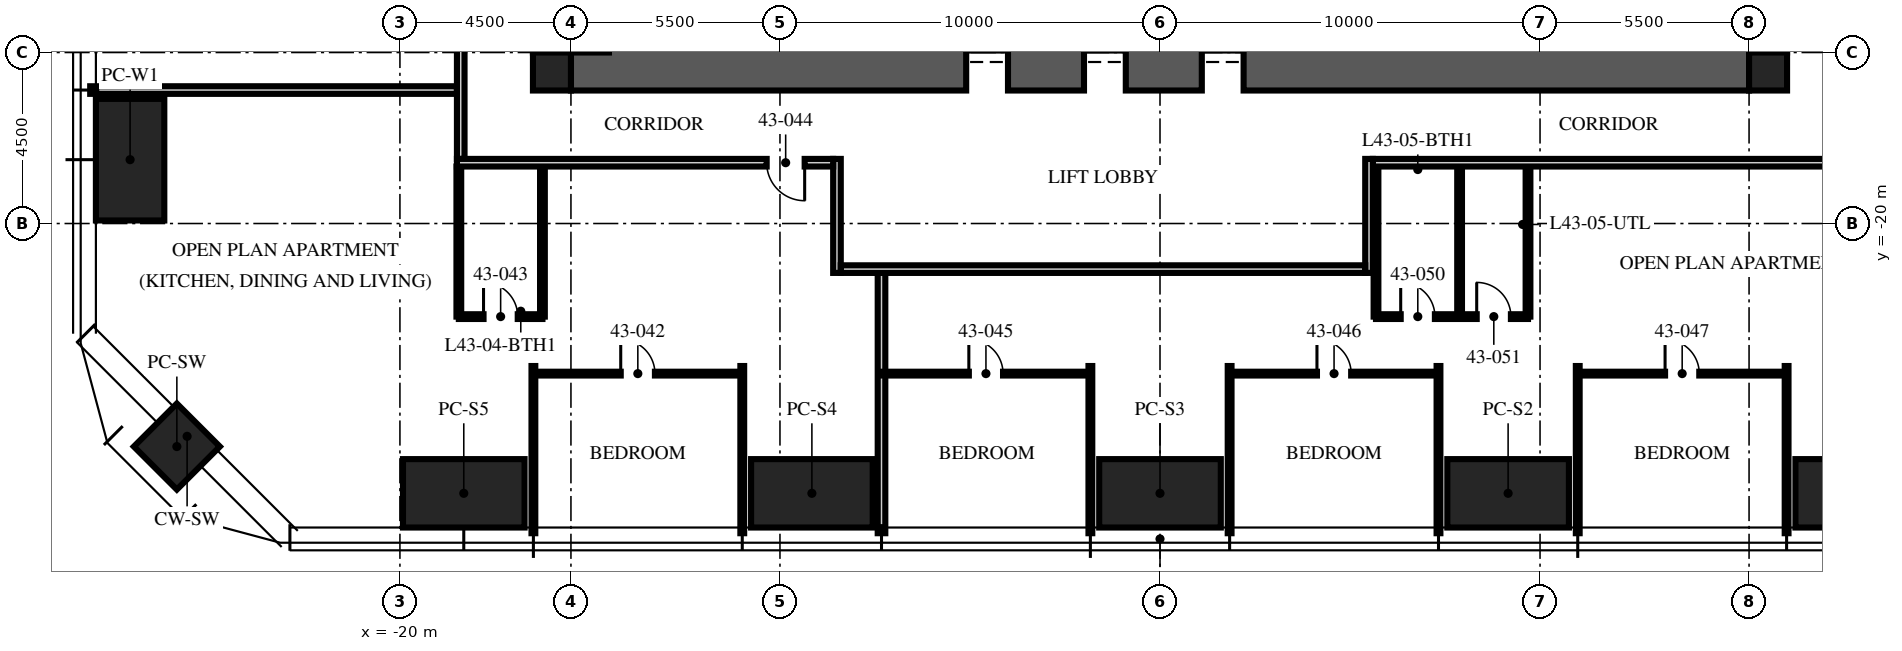
"""IFC4 building model, lengths in metres.
Left out: names, types, materials, properties, quantities, classifications, styles, units other than length and angle.
Written with IfcOpenShell. Run it as: python <this file> out.ifc"""

import sys

from ifc_helpers import new_model, si_unit, direction, frame, frame_2d, origin, origin_2d, place, context, subcontext, project, spatial, rectangle, hollow_rectangle, extrude, element, fill, save


model = new_model("IFC4")
c1 = context("Model", 3, precision=1e-05, world=origin(), true_north=direction((0.0, 1.0)))
c2 = subcontext(c1, "Body", "Model", "MODEL_VIEW")
j1 = project(units=[si_unit("LENGTHUNIT", "METRE"), si_unit("PLANEANGLEUNIT", "RADIAN")], contexts=[c1])
p1 = place(None, origin())
s1 = spatial("IfcSite", under=j1, at=p1, CompositionType="ELEMENT")
p2 = place(p1, origin())
s2 = spatial("IfcBuilding", under=s1, at=p2, CompositionType="ELEMENT")
p3 = place(p2, frame((0.0, 0.0, 171.0)))
s3 = spatial("IfcBuildingStorey", under=s2, at=p3, CompositionType="ELEMENT", Elevation=171.0)
p4 = place(p3, frame((-15.5, -15.5, -0.25), z_axis=(0.0, 0.0, 1.0), x_axis=(1.0, 0.0, 0.0)))
e1 = element("IfcWall", 1, at=p4, inside=s3, PredefinedType="SHEAR", context=c2, shape_type="SweptSolid", body=[
    extrude(rectangle(XDim=31.0, YDim=2.0, at=frame_2d((15.5, 0.0))), origin(), (0.0, 0.0, 1.0), 3.75),
])
p5 = place(p4, frame((10.4, 0.0, 0.25)))
e2 = element("IfcOpeningElement", 2, at=p5, cuts=e1, PredefinedType="OPENING", context=c2, shape_type="SweptSolid", body=[
    extrude(rectangle(XDim=1.1, YDim=2.1, at=frame_2d((0.55, 1.05))), frame((0.0, 1.01, 0.0), z_axis=(0.0, -1.0, 0.0), x_axis=(1.0, 0.0, 0.0)), (0.0, 0.0, 1.0), 2.02),
])
p6 = place(p4, frame((13.5, 0.0, 0.25)))
e3 = element("IfcOpeningElement", 3, at=p6, cuts=e1, PredefinedType="OPENING", context=c2, shape_type="SweptSolid", body=[
    extrude(rectangle(XDim=1.1, YDim=2.1, at=frame_2d((0.55, 1.05))), frame((0.0, 1.01, 0.0), z_axis=(0.0, -1.0, 0.0), x_axis=(1.0, 0.0, 0.0)), (0.0, 0.0, 1.0), 2.02),
])
p7 = place(p4, frame((16.6, 0.0, 0.25)))
e4 = element("IfcOpeningElement", 4, at=p7, cuts=e1, PredefinedType="OPENING", context=c2, shape_type="SweptSolid", body=[
    extrude(rectangle(XDim=1.1, YDim=2.1, at=frame_2d((0.55, 1.05))), frame((0.0, 1.01, 0.0), z_axis=(0.0, -1.0, 0.0), x_axis=(1.0, 0.0, 0.0)), (0.0, 0.0, 1.0), 2.02),
])
for number, where, z_axis, x_axis in (
    (5, (-16.0, -16.0, -0.25), (0.0, 0.0, 1.0), (1.0, 0.0, 0.0)),
    (6, (16.0, -16.0, -0.25), (0.0, 0.0, 1.0), (1.0, 0.0, 0.0)),
):
    element("IfcColumn", number, at=place(p3, frame(where, z_axis=z_axis, x_axis=x_axis)), inside=s3, PredefinedType="COLUMN", context=c2, shape_type="SweptSolid", body=[
        extrude(rectangle(XDim=1.0, YDim=1.0, at=origin_2d()), origin(), (0.0, 0.0, 1.0), 3.75),
    ])
for number, where, z_axis, x_axis in (
    (7, (18.32, -27.1, 0.0), (0.0, 0.0, 1.0), (1.0, 0.0, 0.0)),
    (8, (9.16, -27.1, 0.0), (0.0, 0.0, 1.0), (1.0, 0.0, 0.0)),
    (9, (0.0, -27.1, 0.0), (0.0, 0.0, 1.0), (1.0, 0.0, 0.0)),
    (10, (-9.16, -27.1, 0.0), (0.0, 0.0, 1.0), (1.0, 0.0, 0.0)),
    (11, (-18.32, -27.1, 0.0), (0.0, 0.0, 1.0), (1.0, 0.0, 0.0)),
    (12, (-27.1, -18.32, 0.0), (0.0, 0.0, 1.0), (0.0, 1.0, 0.0)),
):
    element("IfcColumn", number, at=place(p3, frame(where, z_axis=z_axis, x_axis=x_axis)), inside=s3, PredefinedType="COLUMN", context=c2, shape_type="SweptSolid", body=[
        extrude(hollow_rectangle(XDim=3.2, YDim=1.8, WallThickness=0.2, at=origin_2d()), origin(), (0.0, 0.0, 1.0), 3.75),
    ])
p8 = place(p3, frame((-25.87, -25.87, 0.0), z_axis=(0.0, 0.0, 1.0), x_axis=(0.707106781187, -0.707106781187, 0.0)))
e13 = element("IfcColumn", 13, at=p8, inside=s3, PredefinedType="COLUMN", context=c2, shape_type="SweptSolid", body=[
    extrude(hollow_rectangle(XDim=1.6, YDim=1.6, WallThickness=0.1, at=origin_2d()), origin(), (0.0, 0.0, 1.0), 3.75),
])
p9 = place(p3, frame((-18.5, -16.488, 0.0), z_axis=(0.0, 0.0, 1.0), x_axis=(-1.0, 0.0, 0.0)))
e14 = element("IfcWall", 14, at=p9, inside=s3, PredefinedType="PARTITIONING", context=c2, shape_type="SweptSolid", body=[
    extrude(rectangle(XDim=9.65, YDim=0.2, at=frame_2d((4.825, 0.0))), origin(), (0.0, 0.0, 1.0), 2.81),
])
for number, where, z_axis, x_axis in (
    (15, (-16.488, -23.75, 0.0), (0.0, 0.0, 1.0), (0.0, -1.0, 0.0)),
    (16, (-10.992, -23.75, 0.0), (0.0, 0.0, 1.0), (0.0, -1.0, 0.0)),
):
    element("IfcWall", number, at=place(p3, frame(where, z_axis=z_axis, x_axis=x_axis)), inside=s3, PredefinedType="PARTITIONING", context=c2, shape_type="SweptSolid", body=[
        extrude(rectangle(XDim=4.4, YDim=0.1, at=frame_2d((2.2, 0.0))), origin(), (0.0, 0.0, 1.0), 2.81),
    ])
p10 = place(p3, frame((-7.328, -21.3, 0.0), z_axis=(0.0, 0.0, 1.0), x_axis=(0.0, -1.0, 0.0)))
e17 = element("IfcWall", 17, at=p10, inside=s3, PredefinedType="PARTITIONING", context=c2, shape_type="SweptSolid", body=[
    extrude(rectangle(XDim=6.85, YDim=0.2, at=frame_2d((3.425, 0.0))), origin(), (0.0, 0.0, 1.0), 2.81),
])
for number, where, z_axis, x_axis in (
    (18, (-1.832, -23.75, 0.0), (0.0, 0.0, 1.0), (0.0, -1.0, 0.0)),
    (19, (1.832, -23.75, 0.0), (0.0, 0.0, 1.0), (0.0, -1.0, 0.0)),
    (20, (7.328, -23.75, 0.0), (0.0, 0.0, 1.0), (0.0, -1.0, 0.0)),
    (21, (10.992, -23.75, 0.0), (0.0, 0.0, 1.0), (0.0, -1.0, 0.0)),
    (22, (16.488, -23.75, 0.0), (0.0, 0.0, 1.0), (0.0, -1.0, 0.0)),
):
    element("IfcWall", number, at=place(p3, frame(where, z_axis=z_axis, x_axis=x_axis)), inside=s3, PredefinedType="PARTITIONING", context=c2, shape_type="SweptSolid", body=[
        extrude(rectangle(XDim=4.4, YDim=0.1, at=frame_2d((2.2, 0.0))), origin(), (0.0, 0.0, 1.0), 2.81),
    ])
p11 = place(p3, frame((-16.488, -23.95, 0.0), z_axis=(0.0, 0.0, 1.0), x_axis=(1.0, 0.0, 0.0)))
e23 = element("IfcWall", 23, at=p11, inside=s3, PredefinedType="PARTITIONING", context=c2, shape_type="SweptSolid", body=[
    extrude(rectangle(XDim=5.496, YDim=0.1, at=frame_2d((2.748, 0.0))), origin(), (0.0, 0.0, 1.0), 2.81),
])
p12 = place(p11, frame((2.298, 0.0, 0.0)))
e24 = element("IfcOpeningElement", 24, at=p12, cuts=e23, PredefinedType="OPENING", context=c2, shape_type="SweptSolid", body=[
    extrude(rectangle(XDim=0.9, YDim=2.1, at=frame_2d((0.45, 1.05))), frame((0.0, 0.06, 0.0), z_axis=(0.0, -1.0, 0.0), x_axis=(1.0, 0.0, 0.0)), (0.0, 0.0, 1.0), 0.12),
])
p13 = place(p3, frame((-18.45, -22.45, 0.0), z_axis=(0.0, 0.0, 1.0), x_axis=(1.0, 0.0, 0.0)))
e25 = element("IfcWall", 25, at=p13, inside=s3, PredefinedType="PARTITIONING", context=c2, shape_type="SweptSolid", body=[
    extrude(rectangle(XDim=2.2, YDim=0.125, at=frame_2d((1.1, 0.0))), origin(), (0.0, 0.0, 1.0), 2.7),
])
p14 = place(p13, frame((0.65, 0.0, 0.0)))
e26 = element("IfcOpeningElement", 26, at=p14, cuts=e25, PredefinedType="OPENING", context=c2, shape_type="SweptSolid", body=[
    extrude(rectangle(XDim=0.9, YDim=2.1, at=frame_2d((0.45, 1.05))), frame((0.0, 0.073, 0.0), z_axis=(0.0, -1.0, 0.0), x_axis=(1.0, 0.0, 0.0)), (0.0, 0.0, 1.0), 0.145),
])
p15 = place(p3, frame((-18.45, -18.5, 0.0), z_axis=(0.0, 0.0, 1.0), x_axis=(0.0, -1.0, 0.0)))
e27 = element("IfcWall", 27, at=p15, inside=s3, PredefinedType="PARTITIONING", context=c2, shape_type="SweptSolid", body=[
    extrude(rectangle(XDim=3.95, YDim=0.125, at=frame_2d((1.975, 0.0))), origin(), (0.0, 0.0, 1.0), 2.3),
])
p16 = place(p3, frame((-16.25, -18.5, 0.0), z_axis=(0.0, 0.0, 1.0), x_axis=(0.0, -1.0, 0.0)))
e28 = element("IfcWall", 28, at=p16, inside=s3, PredefinedType="PARTITIONING", context=c2, shape_type="SweptSolid", body=[
    extrude(rectangle(XDim=3.95, YDim=0.125, at=frame_2d((1.975, 0.0))), origin(), (0.0, 0.0, 1.0), 3.5),
])
p17 = place(p3, frame((-7.328, -23.95, 0.0), z_axis=(0.0, 0.0, 1.0), x_axis=(1.0, 0.0, 0.0)))
e29 = element("IfcWall", 29, at=p17, inside=s3, PredefinedType="PARTITIONING", context=c2, shape_type="SweptSolid", body=[
    extrude(rectangle(XDim=5.496, YDim=0.1, at=frame_2d((2.748, 0.0))), origin(), (0.0, 0.0, 1.0), 2.81),
])
p18 = place(p17, frame((2.298, 0.0, 0.0)))
e30 = element("IfcOpeningElement", 30, at=p18, cuts=e29, PredefinedType="OPENING", context=c2, shape_type="SweptSolid", body=[
    extrude(rectangle(XDim=0.9, YDim=2.1, at=frame_2d((0.45, 1.05))), frame((0.0, 0.06, 0.0), z_axis=(0.0, -1.0, 0.0), x_axis=(1.0, 0.0, 0.0)), (0.0, 0.0, 1.0), 0.12),
])
p19 = place(p3, frame((1.832, -23.95, 0.0), z_axis=(0.0, 0.0, 1.0), x_axis=(1.0, 0.0, 0.0)))
e31 = element("IfcWall", 31, at=p19, inside=s3, PredefinedType="PARTITIONING", context=c2, shape_type="SweptSolid", body=[
    extrude(rectangle(XDim=5.496, YDim=0.1, at=frame_2d((2.748, 0.0))), origin(), (0.0, 0.0, 1.0), 2.81),
])
p20 = place(p19, frame((2.298, 0.0, 0.0)))
e32 = element("IfcOpeningElement", 32, at=p20, cuts=e31, PredefinedType="OPENING", context=c2, shape_type="SweptSolid", body=[
    extrude(rectangle(XDim=0.9, YDim=2.1, at=frame_2d((0.45, 1.05))), frame((0.0, 0.06, 0.0), z_axis=(0.0, -1.0, 0.0), x_axis=(1.0, 0.0, 0.0)), (0.0, 0.0, 1.0), 0.12),
])
p21 = place(p3, frame((10.992, -23.95, 0.0), z_axis=(0.0, 0.0, 1.0), x_axis=(1.0, 0.0, 0.0)))
e33 = element("IfcWall", 33, at=p21, inside=s3, PredefinedType="PARTITIONING", context=c2, shape_type="SweptSolid", body=[
    extrude(rectangle(XDim=5.496, YDim=0.1, at=frame_2d((2.748, 0.0))), origin(), (0.0, 0.0, 1.0), 2.81),
])
p22 = place(p21, frame((2.298, 0.0, 0.0)))
e34 = element("IfcOpeningElement", 34, at=p22, cuts=e33, PredefinedType="OPENING", context=c2, shape_type="SweptSolid", body=[
    extrude(rectangle(XDim=0.9, YDim=2.1, at=frame_2d((0.45, 1.05))), frame((0.0, 0.06, 0.0), z_axis=(0.0, -1.0, 0.0), x_axis=(1.0, 0.0, 0.0)), (0.0, 0.0, 1.0), 0.12),
])
p23 = place(p3, frame((5.684, -22.45, 0.0), z_axis=(0.0, 0.0, 1.0), x_axis=(1.0, 0.0, 0.0)))
e35 = element("IfcWall", 35, at=p23, inside=s3, PredefinedType="PARTITIONING", context=c2, shape_type="SweptSolid", body=[
    extrude(rectangle(XDim=4.0, YDim=0.125, at=frame_2d((2.0, 0.0))), origin(), (0.0, 0.0, 1.0), 2.7),
])
p24 = place(p23, frame((0.65, 0.0, 0.0)))
e36 = element("IfcOpeningElement", 36, at=p24, cuts=e35, PredefinedType="OPENING", context=c2, shape_type="SweptSolid", body=[
    extrude(rectangle(XDim=0.9, YDim=2.1, at=frame_2d((0.45, 1.05))), frame((0.0, 0.073, 0.0), z_axis=(0.0, -1.0, 0.0), x_axis=(1.0, 0.0, 0.0)), (0.0, 0.0, 1.0), 0.145),
])
p25 = place(p23, frame((2.65, 0.0, 0.0)))
e37 = element("IfcOpeningElement", 37, at=p25, cuts=e35, PredefinedType="OPENING", context=c2, shape_type="SweptSolid", body=[
    extrude(rectangle(XDim=0.9, YDim=2.1, at=frame_2d((0.45, 1.05))), frame((0.0, 0.073, 0.0), z_axis=(0.0, -1.0, 0.0), x_axis=(1.0, 0.0, 0.0)), (0.0, 0.0, 1.0), 0.145),
])
for number, where, z_axis, x_axis in (
    (38, (5.684, -18.5, 0.0), (0.0, 0.0, 1.0), (0.0, -1.0, 0.0)),
    (39, (7.884, -18.5, 0.0), (0.0, 0.0, 1.0), (0.0, -1.0, 0.0)),
    (40, (9.684, -18.5, 0.0), (0.0, 0.0, 1.0), (0.0, -1.0, 0.0)),
):
    element("IfcWall", number, at=place(p3, frame(where, z_axis=z_axis, x_axis=x_axis)), inside=s3, PredefinedType="PARTITIONING", context=c2, shape_type="SweptSolid", body=[
        extrude(rectangle(XDim=3.95, YDim=0.125, at=frame_2d((1.975, 0.0))), origin(), (0.0, 0.0, 1.0), 3.5),
    ])
p26 = place(p3, frame((-18.4, 5.328, 0.0), z_axis=(0.0, 0.0, 1.0), x_axis=(0.0, -1.0, 0.0)))
e41 = element("IfcWall", 41, at=p26, inside=s3, PredefinedType="PARTITIONING", context=c2, shape_type="SweptSolid", body=[
    extrude(rectangle(XDim=23.628, YDim=0.2, at=frame_2d((11.814, 0.0))), origin(), (0.0, 0.0, 1.0), 2.3),
])
p27 = place(p3, frame((18.5, -18.4, 0.0), z_axis=(0.0, 0.0, 1.0), x_axis=(-1.0, 0.0, 0.0)))
e42 = element("IfcWall", 42, at=p27, inside=s3, PredefinedType="PARTITIONING", context=c2, shape_type="SweptSolid", body=[
    extrude(rectangle(XDim=12.9, YDim=0.2, at=frame_2d((6.45, 0.0))), origin(), (0.0, 0.0, 1.0), 2.3),
])
for number, where, z_axis, x_axis in (
    (43, (5.5, -18.3, 0.0), (0.0, 0.0, 1.0), (0.0, -1.0, 0.0)),
    (44, (-8.5, -18.3, 0.0), (0.0, 0.0, 1.0), (0.0, -1.0, 0.0)),
):
    element("IfcWall", number, at=place(p3, frame(where, z_axis=z_axis, x_axis=x_axis)), inside=s3, PredefinedType="PARTITIONING", context=c2, shape_type="SweptSolid", body=[
        extrude(rectangle(XDim=3.0, YDim=0.2, at=frame_2d((1.5, 0.0))), origin(), (0.0, 0.0, 1.0), 3.5),
    ])
p28 = place(p3, frame((5.4, -21.2, 0.0), z_axis=(0.0, 0.0, 1.0), x_axis=(-1.0, 0.0, 0.0)))
e45 = element("IfcWall", 45, at=p28, inside=s3, PredefinedType="PARTITIONING", context=c2, shape_type="SweptSolid", body=[
    extrude(rectangle(XDim=13.8, YDim=0.2, at=frame_2d((6.9, 0.0))), origin(), (0.0, 0.0, 1.0), 2.7),
])
p29 = place(p3, frame((-8.6, -18.4, 0.0), z_axis=(0.0, 0.0, 1.0), x_axis=(-1.0, 0.0, 0.0)))
e46 = element("IfcWall", 46, at=p29, inside=s3, PredefinedType="PARTITIONING", context=c2, shape_type="SweptSolid", body=[
    extrude(rectangle(XDim=9.9, YDim=0.2, at=frame_2d((4.95, 0.0))), origin(), (0.0, 0.0, 1.0), 2.3),
])
p30 = place(p29, frame((0.75, 0.0, 0.0)))
e47 = element("IfcOpeningElement", 47, at=p30, cuts=e46, PredefinedType="OPENING", context=c2, shape_type="SweptSolid", body=[
    extrude(rectangle(XDim=1.0, YDim=2.2, at=frame_2d((0.5, 1.1))), frame((0.0, 0.11, 0.0), z_axis=(0.0, -1.0, 0.0), x_axis=(1.0, 0.0, 0.0)), (0.0, 0.0, 1.0), 0.22),
])
p31 = place(p5, origin())
e48 = element("IfcDoor", 48, at=p31, inside=s3, OperationType="DOUBLE_DOOR_SLIDING", PredefinedType="DOOR", context=c2, shape_type="SweptSolid", body=[
    extrude(rectangle(XDim=1.1, YDim=2.1, at=frame_2d((0.55, 1.05))), frame((0.0, 0.025, 0.0), z_axis=(0.0, -1.0, 0.0), x_axis=(1.0, 0.0, 0.0)), (0.0, 0.0, 1.0), 0.05),
])
fill(e2, e48)
p32 = place(p6, origin())
e49 = element("IfcDoor", 49, at=p32, inside=s3, OperationType="DOUBLE_DOOR_SLIDING", PredefinedType="DOOR", context=c2, shape_type="SweptSolid", body=[
    extrude(rectangle(XDim=1.1, YDim=2.1, at=frame_2d((0.55, 1.05))), frame((0.0, 0.025, 0.0), z_axis=(0.0, -1.0, 0.0), x_axis=(1.0, 0.0, 0.0)), (0.0, 0.0, 1.0), 0.05),
])
fill(e3, e49)
p33 = place(p7, origin())
e50 = element("IfcDoor", 50, at=p33, inside=s3, OperationType="DOUBLE_DOOR_SLIDING", PredefinedType="DOOR", context=c2, shape_type="SweptSolid", body=[
    extrude(rectangle(XDim=1.1, YDim=2.1, at=frame_2d((0.55, 1.05))), frame((0.0, 0.025, 0.0), z_axis=(0.0, -1.0, 0.0), x_axis=(1.0, 0.0, 0.0)), (0.0, 0.0, 1.0), 0.05),
])
fill(e4, e50)
p34 = place(p12, origin())
e51 = element("IfcDoor", 51, at=p34, inside=s3, OperationType="SINGLE_SWING_LEFT", PredefinedType="DOOR", context=c2, shape_type="SweptSolid", body=[
    extrude(rectangle(XDim=0.9, YDim=2.1, at=frame_2d((0.45, 1.05))), frame((0.0, 0.025, 0.0), z_axis=(0.0, -1.0, 0.0), x_axis=(1.0, 0.0, 0.0)), (0.0, 0.0, 1.0), 0.05),
])
fill(e24, e51)
p35 = place(p14, origin())
e52 = element("IfcDoor", 52, at=p35, inside=s3, OperationType="SINGLE_SWING_LEFT", PredefinedType="DOOR", context=c2, shape_type="SweptSolid", body=[
    extrude(rectangle(XDim=0.9, YDim=2.1, at=frame_2d((0.45, 1.05))), frame((0.0, 0.025, 0.0), z_axis=(0.0, -1.0, 0.0), x_axis=(1.0, 0.0, 0.0)), (0.0, 0.0, 1.0), 0.05),
])
fill(e26, e52)
p36 = place(p30, origin())
e53 = element("IfcDoor", 53, at=p36, inside=s3, OperationType="SINGLE_SWING_LEFT", PredefinedType="DOOR", context=c2, shape_type="SweptSolid", body=[
    extrude(rectangle(XDim=1.0, YDim=2.2, at=frame_2d((0.5, 1.1))), frame((0.0, 0.025, 0.0), z_axis=(0.0, -1.0, 0.0), x_axis=(1.0, 0.0, 0.0)), (0.0, 0.0, 1.0), 0.05),
])
fill(e47, e53)
p37 = place(p18, origin())
e54 = element("IfcDoor", 54, at=p37, inside=s3, OperationType="SINGLE_SWING_LEFT", PredefinedType="DOOR", context=c2, shape_type="SweptSolid", body=[
    extrude(rectangle(XDim=0.9, YDim=2.1, at=frame_2d((0.45, 1.05))), frame((0.0, 0.025, 0.0), z_axis=(0.0, -1.0, 0.0), x_axis=(1.0, 0.0, 0.0)), (0.0, 0.0, 1.0), 0.05),
])
fill(e30, e54)
p38 = place(p20, origin())
e55 = element("IfcDoor", 55, at=p38, inside=s3, OperationType="SINGLE_SWING_LEFT", PredefinedType="DOOR", context=c2, shape_type="SweptSolid", body=[
    extrude(rectangle(XDim=0.9, YDim=2.1, at=frame_2d((0.45, 1.05))), frame((0.0, 0.025, 0.0), z_axis=(0.0, -1.0, 0.0), x_axis=(1.0, 0.0, 0.0)), (0.0, 0.0, 1.0), 0.05),
])
fill(e32, e55)
p39 = place(p22, origin())
e56 = element("IfcDoor", 56, at=p39, inside=s3, OperationType="SINGLE_SWING_LEFT", PredefinedType="DOOR", context=c2, shape_type="SweptSolid", body=[
    extrude(rectangle(XDim=0.9, YDim=2.1, at=frame_2d((0.45, 1.05))), frame((0.0, 0.025, 0.0), z_axis=(0.0, -1.0, 0.0), x_axis=(1.0, 0.0, 0.0)), (0.0, 0.0, 1.0), 0.05),
])
fill(e34, e56)
p40 = place(p24, origin())
e57 = element("IfcDoor", 57, at=p40, inside=s3, OperationType="SINGLE_SWING_LEFT", PredefinedType="DOOR", context=c2, shape_type="SweptSolid", body=[
    extrude(rectangle(XDim=0.9, YDim=2.1, at=frame_2d((0.45, 1.05))), frame((0.0, 0.025, 0.0), z_axis=(0.0, -1.0, 0.0), x_axis=(1.0, 0.0, 0.0)), (0.0, 0.0, 1.0), 0.05),
])
fill(e36, e57)
p41 = place(p25, origin())
e58 = element("IfcDoor", 58, at=p41, inside=s3, OperationType="SINGLE_SWING_LEFT", PredefinedType="DOOR", context=c2, shape_type="SweptSolid", body=[
    extrude(rectangle(XDim=0.9, YDim=2.1, at=frame_2d((0.45, 1.05))), frame((0.0, 0.025, 0.0), z_axis=(0.0, -1.0, 0.0), x_axis=(1.0, 0.0, 0.0)), (0.0, 0.0, 1.0), 0.05),
])
fill(e37, e58)
save(model, sys.argv[1])
